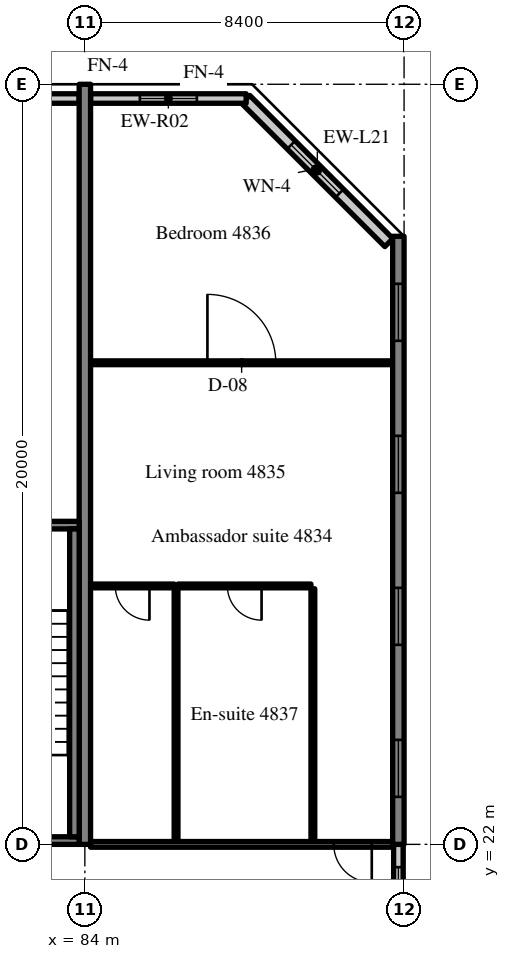
"""IFC4 building model, lengths in metres.
Left out: names, types, materials, properties, quantities, classifications, styles, units other than length and angle.
Written with IfcOpenShell. Run it as: python <this file> out.ifc"""

import sys

from ifc_helpers import new_model, si_unit, direction, frame, frame_2d, origin, place, context, subcontext, project, spatial, rectangle, extrude, source, transform, mapped, element, fill, save


model = new_model("IFC4")
c1 = context("Model", 3, precision=1e-05, world=origin(), true_north=direction((0.0, 1.0)))
c2 = subcontext(c1, "Body", "Model", "MODEL_VIEW")
j1 = project(units=[si_unit("LENGTHUNIT", "METRE"), si_unit("PLANEANGLEUNIT", "RADIAN")], contexts=[c1])
p1 = place(None, origin())
s1 = spatial("IfcSite", under=j1, at=p1, CompositionType="ELEMENT")
p2 = place(p1, origin())
s2 = spatial("IfcBuilding", under=s1, at=p2, CompositionType="ELEMENT")
p3 = place(p2, frame((0.0, 0.0, 197.2)))
s3 = spatial("IfcBuildingStorey", under=s2, at=p3, CompositionType="ELEMENT", Elevation=197.2)
m1 = source(origin(), c2, "Body", "SweptSolid", [
    extrude(rectangle(XDim=20.0, YDim=0.3, at=frame_2d((10.0, 0.0))), origin(), (0.0, 0.0, 1.0), 3.52),
])
p4 = place(p3, frame((84.0, 22.0, 0.0), z_axis=(0.0, 0.0, 1.0), x_axis=(0.0, 1.0, 0.0)))
e1 = element("IfcWall", 1, at=p4, inside=s3, PredefinedType="SHEAR", context=c2, shape_type="MappedRepresentation", body=[
    mapped(m1, transform((0.0, 0.0, 0.0), scale=1.0)),
])
m2 = source(origin(), c2, "Body", "SweptSolid", [
    extrude(rectangle(XDim=16.0, YDim=0.3, at=frame_2d((8.0, 0.0))), origin(), (0.0, 0.0, 1.0), 3.52),
])
p5 = place(p3, frame((92.25, 22.0, 0.0), z_axis=(0.0, 0.0, 1.0), x_axis=(0.0, 1.0, 0.0)))
e2 = element("IfcWall", 2, at=p5, inside=s3, PredefinedType="SHEAR", context=c2, shape_type="MappedRepresentation", body=[
    mapped(m2, transform((0.0, 0.0, 0.0), scale=1.0)),
])
m3 = source(origin(), c2, "Body", "SweptSolid", [
    extrude(rectangle(XDim=1.5, YDim=1.5, at=frame_2d((0.75, 0.75))), frame((0.0, 0.16, 0.0), z_axis=(0.0, -1.0, 0.0), x_axis=(1.0, 0.0, 0.0)), (0.0, 0.0, 1.0), 0.32),
])
p6 = place(p5, frame((1.25, 0.0, 0.9)))
e3 = element("IfcOpeningElement", 3, at=p6, cuts=e2, PredefinedType="OPENING", context=c2, shape_type="MappedRepresentation", body=[
    mapped(m3, transform((0.0, 0.0, 0.0), scale=1.0)),
])
p7 = place(p5, frame((5.25, 0.0, 0.9)))
e4 = element("IfcOpeningElement", 4, at=p7, cuts=e2, PredefinedType="OPENING", context=c2, shape_type="MappedRepresentation", body=[
    mapped(m3, transform((0.0, 0.0, 0.0), scale=1.0)),
])
p8 = place(p5, frame((9.25, 0.0, 0.9)))
e5 = element("IfcOpeningElement", 5, at=p8, cuts=e2, PredefinedType="OPENING", context=c2, shape_type="MappedRepresentation", body=[
    mapped(m3, transform((0.0, 0.0, 0.0), scale=1.0)),
])
p9 = place(p5, frame((13.25, 0.0, 0.9)))
e6 = element("IfcOpeningElement", 6, at=p9, cuts=e2, PredefinedType="OPENING", context=c2, shape_type="MappedRepresentation", body=[
    mapped(m3, transform((0.0, 0.0, 0.0), scale=1.0)),
])
m4 = source(origin(), c2, "Body", "SweptSolid", [
    extrude(rectangle(XDim=5.326, YDim=0.3, at=frame_2d((2.663, 0.0))), origin(), (0.0, 0.0, 1.0), 3.52),
])
p10 = place(p3, frame((92.0, 37.834, 0.0), z_axis=(0.0, 0.0, 1.0), x_axis=(-0.707083859269, 0.707129702361, 0.0)))
e7 = element("IfcWall", 7, at=p10, inside=s3, PredefinedType="SOLIDWALL", context=c2, shape_type="MappedRepresentation", body=[
    mapped(m4, transform((0.0, 0.0, 0.0), scale=1.0)),
])
m5 = source(origin(), c2, "Body", "SweptSolid", [
    extrude(rectangle(XDim=1.8, YDim=1.5, at=frame_2d((0.9, 0.75))), frame((0.0, 0.16, 0.0), z_axis=(0.0, -1.0, 0.0), x_axis=(1.0, 0.0, 0.0)), (0.0, 0.0, 1.0), 0.32),
])
p11 = place(p10, frame((1.836, 0.0, 0.9)))
e8 = element("IfcOpeningElement", 8, at=p11, cuts=e7, PredefinedType="OPENING", context=c2, shape_type="MappedRepresentation", body=[
    mapped(m5, transform((0.0, 0.0, 0.0), scale=1.0)),
])
m6 = source(origin(), c2, "Body", "SweptSolid", [
    extrude(rectangle(XDim=1.708, YDim=0.25, at=frame_2d((0.854, 0.0))), origin(), (0.0, 0.0, 1.0), 2.87),
])
p12 = place(p3, frame((83.85, 41.625, 0.0), z_axis=(0.0, 0.0, 1.0), x_axis=(-1.0, 0.0, 0.0)))
e9 = element("IfcWall", 9, at=p12, inside=s3, PredefinedType="SOLIDWALL", context=c2, shape_type="MappedRepresentation", body=[
    mapped(m6, transform((0.0, 0.0, 0.0), scale=1.0)),
])
m7 = source(origin(), c2, "Body", "SweptSolid", [
    extrude(rectangle(XDim=4.095, YDim=0.25, at=frame_2d((2.047, 0.0))), origin(), (0.0, 0.0, 1.0), 2.87),
])
p13 = place(p3, frame((88.245, 41.625, 0.0), z_axis=(0.0, 0.0, 1.0), x_axis=(-1.0, 0.0, 0.0)))
e10 = element("IfcWall", 10, at=p13, inside=s3, PredefinedType="SOLIDWALL", context=c2, shape_type="MappedRepresentation", body=[
    mapped(m7, transform((0.0, 0.0, 0.0), scale=1.0)),
])
m8 = source(origin(), c2, "Body", "SweptSolid", [
    extrude(rectangle(XDim=1.5, YDim=1.5, at=frame_2d((0.75, 0.75))), frame((0.0, 0.135, 0.0), z_axis=(0.0, -1.0, 0.0), x_axis=(1.0, 0.0, 0.0)), (0.0, 0.0, 1.0), 0.27),
])
p14 = place(p13, frame((1.297, 0.0, 0.9)))
e11 = element("IfcOpeningElement", 11, at=p14, cuts=e10, PredefinedType="OPENING", context=c2, shape_type="MappedRepresentation", body=[
    mapped(m8, transform((0.0, 0.0, 0.0), scale=1.0)),
])
m9 = source(origin(), c2, "Body", "SweptSolid", [
    extrude(rectangle(XDim=2.4, YDim=0.25, at=frame_2d((1.2, 0.0))), origin(), (0.0, 0.0, 1.0), 2.62),
])
p15 = place(p3, frame((92.25, 19.6, 0.0), z_axis=(0.0, 0.0, 1.0), x_axis=(0.0, 1.0, 0.0)))
e12 = element("IfcWall", 12, at=p15, inside=s3, PredefinedType="SOLIDWALL", context=c2, shape_type="MappedRepresentation", body=[
    mapped(m9, transform((0.0, 0.0, 0.0), scale=1.0)),
])
m10 = source(origin(), c2, "Body", "SweptSolid", [
    extrude(rectangle(XDim=1.2, YDim=1.5, at=frame_2d((0.6, 0.75))), frame((0.0, 0.135, 0.0), z_axis=(0.0, -1.0, 0.0), x_axis=(1.0, 0.0, 0.0)), (0.0, 0.0, 1.0), 0.27),
])
p16 = place(p15, frame((0.6, 0.0, 0.9)))
e13 = element("IfcOpeningElement", 13, at=p16, cuts=e12, PredefinedType="OPENING", context=c2, shape_type="MappedRepresentation", body=[
    mapped(m10, transform((0.0, 0.0, 0.0), scale=1.0)),
])
m11 = source(origin(), c2, "Body", "SweptSolid", [
    extrude(rectangle(XDim=8.25, YDim=0.2, at=frame_2d((4.125, 0.0))), origin(), (0.0, 0.0, 1.0), 3.52),
])
p17 = place(p3, frame((83.85, 22.1, 0.0), z_axis=(0.0, 0.0, 1.0), x_axis=(-1.0, 0.0, 0.0)))
e14 = element("IfcWall", 14, at=p17, inside=s3, PredefinedType="SOLIDWALL", context=c2, shape_type="MappedRepresentation", body=[
    mapped(m11, transform((0.0, 0.0, 0.0), scale=1.0)),
])
m12 = source(origin(), c2, "Body", "SweptSolid", [
    extrude(rectangle(XDim=1.2, YDim=2.1, at=frame_2d((0.6, 1.05))), frame((0.0, 0.11, 0.0), z_axis=(0.0, -1.0, 0.0), x_axis=(1.0, 0.0, 0.0)), (0.0, 0.0, 1.0), 0.22),
])
p18 = place(p17, frame((6.05, 0.0, 0.0)))
e15 = element("IfcOpeningElement", 15, at=p18, cuts=e14, PredefinedType="OPENING", context=c2, shape_type="MappedRepresentation", body=[
    mapped(m12, transform((0.0, 0.0, 0.0), scale=1.0)),
])
p19 = place(p3, frame((83.85, 30.4, 0.0), z_axis=(0.0, 0.0, 1.0), x_axis=(-1.0, 0.0, 0.0)))
e16 = element("IfcWall", 16, at=p19, inside=s3, PredefinedType="SOLIDWALL", context=c2, shape_type="MappedRepresentation", body=[
    mapped(m11, transform((0.0, 0.0, 0.0), scale=1.0)),
])
m13 = source(origin(), c2, "Body", "SweptSolid", [
    extrude(rectangle(XDim=1.0, YDim=2.1, at=frame_2d((0.5, 1.05))), frame((0.0, 0.11, 0.0), z_axis=(0.0, -1.0, 0.0), x_axis=(1.0, 0.0, 0.0)), (0.0, 0.0, 1.0), 0.22),
])
p20 = place(p19, frame((6.15, 0.0, 0.0)))
e17 = element("IfcOpeningElement", 17, at=p20, cuts=e16, PredefinedType="OPENING", context=c2, shape_type="MappedRepresentation", body=[
    mapped(m13, transform((0.0, 0.0, 0.0), scale=1.0)),
])
m14 = source(origin(), c2, "Body", "SweptSolid", [
    extrude(rectangle(XDim=8.1, YDim=0.25, at=frame_2d((4.05, 0.0))), origin(), (0.0, 0.0, 1.0), 3.52),
])
p21 = place(p3, frame((83.725, 22.2, 0.0), z_axis=(0.0, 0.0, 1.0), x_axis=(0.0, 1.0, 0.0)))
e18 = element("IfcWall", 18, at=p21, inside=s3, PredefinedType="SOLIDWALL", context=c2, shape_type="MappedRepresentation", body=[
    mapped(m14, transform((0.0, 0.0, 0.0), scale=1.0)),
])
m15 = source(origin(), c2, "Body", "SweptSolid", [
    extrude(rectangle(XDim=6.65, YDim=0.1, at=frame_2d((3.325, 0.0))), origin(), (0.0, 0.0, 1.0), 3.52),
])
for number, where, z_axis, x_axis in (
    (19, (90.0, 22.075, 0.0), (0.0, 0.0, 1.0), (0.0, 1.0, 0.0)),
    (20, (86.4, 22.075, 0.0), (0.0, 0.0, 1.0), (0.0, 1.0, 0.0)),
):
    element("IfcWall", number, at=place(p3, frame(where, z_axis=z_axis, x_axis=x_axis)), inside=s3, PredefinedType="PARTITIONING", context=c2, shape_type="MappedRepresentation", body=[
        mapped(m15, transform((0.0, 0.0, 0.0), scale=1.0)),
    ])
m16 = source(origin(), c2, "Body", "SweptSolid", [
    extrude(rectangle(XDim=3.5, YDim=0.1, at=frame_2d((1.75, 0.0))), origin(), (0.0, 0.0, 1.0), 3.52),
])
p22 = place(p3, frame((86.45, 28.8, 0.0), z_axis=(0.0, 0.0, 1.0), x_axis=(1.0, 0.0, 0.0)))
e21 = element("IfcWall", 21, at=p22, inside=s3, PredefinedType="PARTITIONING", context=c2, shape_type="MappedRepresentation", body=[
    mapped(m16, transform((0.0, 0.0, 0.0), scale=1.0)),
])
m17 = source(origin(), c2, "Body", "SweptSolid", [
    extrude(rectangle(XDim=0.9, YDim=2.1, at=frame_2d((0.45, 1.05))), frame((0.0, 0.06, 0.0), z_axis=(0.0, -1.0, 0.0), x_axis=(1.0, 0.0, 0.0)), (0.0, 0.0, 1.0), 0.12),
])
p23 = place(p22, frame((1.3, 0.0, 0.0)))
e22 = element("IfcOpeningElement", 22, at=p23, cuts=e21, PredefinedType="OPENING", context=c2, shape_type="MappedRepresentation", body=[
    mapped(m17, transform((0.0, 0.0, 0.0), scale=1.0)),
])
m18 = source(origin(), c2, "Body", "SweptSolid", [
    extrude(rectangle(XDim=2.2, YDim=0.1, at=frame_2d((1.1, 0.0))), origin(), (0.0, 0.0, 1.0), 3.52),
])
p24 = place(p3, frame((84.15, 28.8, 0.0), z_axis=(0.0, 0.0, 1.0), x_axis=(1.0, 0.0, 0.0)))
e23 = element("IfcWall", 23, at=p24, inside=s3, PredefinedType="PARTITIONING", context=c2, shape_type="MappedRepresentation", body=[
    mapped(m18, transform((0.0, 0.0, 0.0), scale=1.0)),
])
p25 = place(p24, frame((0.65, 0.0, 0.0)))
e24 = element("IfcOpeningElement", 24, at=p25, cuts=e23, PredefinedType="OPENING", context=c2, shape_type="MappedRepresentation", body=[
    mapped(m17, transform((0.0, 0.0, 0.0), scale=1.0)),
])
m19 = source(origin(), c2, "Body", "SweptSolid", [
    extrude(rectangle(XDim=7.95, YDim=0.1, at=frame_2d((3.975, 0.0))), origin(), (0.0, 0.0, 1.0), 3.52),
])
p26 = place(p3, frame((84.15, 34.672, 0.0), z_axis=(0.0, 0.0, 1.0), x_axis=(1.0, 0.0, 0.0)))
e25 = element("IfcWall", 25, at=p26, inside=s3, PredefinedType="PARTITIONING", context=c2, shape_type="MappedRepresentation", body=[
    mapped(m19, transform((0.0, 0.0, 0.0), scale=1.0)),
])
m20 = source(origin(), c2, "Body", "SweptSolid", [
    extrude(rectangle(XDim=1.8, YDim=2.1, at=frame_2d((0.9, 1.05))), frame((0.0, 0.06, 0.0), z_axis=(0.0, -1.0, 0.0), x_axis=(1.0, 0.0, 0.0)), (0.0, 0.0, 1.0), 0.12),
])
p27 = place(p26, frame((3.075, 0.0, 0.0)))
e26 = element("IfcOpeningElement", 26, at=p27, cuts=e25, PredefinedType="OPENING", context=c2, shape_type="MappedRepresentation", body=[
    mapped(m20, transform((0.0, 0.0, 0.0), scale=1.0)),
])
m21 = source(origin(), c2, "Body", "SweptSolid", [
    extrude(rectangle(XDim=7.95, YDim=0.15, at=frame_2d((3.975, 0.0))), origin(), (0.0, 0.0, 1.0), 2.82),
])
p28 = place(p3, frame((84.15, 22.0, 0.0), z_axis=(0.0, 0.0, 1.0), x_axis=(1.0, 0.0, 0.0)))
e27 = element("IfcWall", 27, at=p28, inside=s3, PredefinedType="PARTITIONING", context=c2, shape_type="MappedRepresentation", body=[
    mapped(m21, transform((0.0, 0.0, 0.0), scale=1.0)),
])
m22 = source(origin(), c2, "Body", "SweptSolid", [
    extrude(rectangle(XDim=1.0, YDim=2.1, at=frame_2d((0.5, 1.05))), frame((0.0, 0.085, 0.0), z_axis=(0.0, -1.0, 0.0), x_axis=(1.0, 0.0, 0.0)), (0.0, 0.0, 1.0), 0.17),
])
p29 = place(p28, frame((6.4, 0.0, 0.0)))
e28 = element("IfcOpeningElement", 28, at=p29, cuts=e27, PredefinedType="OPENING", context=c2, shape_type="MappedRepresentation", body=[
    mapped(m22, transform((0.0, 0.0, 0.0), scale=1.0)),
])
m23 = source(origin(), c2, "Body", "SweptSolid", [
    extrude(rectangle(XDim=1.8, YDim=1.5, at=frame_2d((0.9, 0.75))), frame((0.0, 0.03, 0.0), z_axis=(0.0, -1.0, 0.0), x_axis=(1.0, 0.0, 0.0)), (0.0, 0.0, 1.0), 0.06),
])
p30 = place(p11, origin())
e29 = element("IfcWindow", 29, at=p30, inside=s3, PartitioningType="SINGLE_PANEL", PredefinedType="WINDOW", context=c2, shape_type="MappedRepresentation", body=[
    mapped(m23, transform((0.0, 0.0, 0.0), scale=1.0)),
])
fill(e8, e29)
m24 = source(origin(), c2, "Body", "SweptSolid", [
    extrude(rectangle(XDim=1.5, YDim=1.5, at=frame_2d((0.75, 0.75))), frame((0.0, 0.03, 0.0), z_axis=(0.0, -1.0, 0.0), x_axis=(1.0, 0.0, 0.0)), (0.0, 0.0, 1.0), 0.06),
])
p31 = place(p14, origin())
e30 = element("IfcWindow", 30, at=p31, inside=s3, PartitioningType="SINGLE_PANEL", PredefinedType="WINDOW", context=c2, shape_type="MappedRepresentation", body=[
    mapped(m24, transform((0.0, 0.0, 0.0), scale=1.0)),
])
fill(e11, e30)
p32 = place(p6, origin())
e31 = element("IfcWindow", 31, at=p32, inside=s3, PartitioningType="SINGLE_PANEL", PredefinedType="WINDOW", context=c2, shape_type="MappedRepresentation", body=[
    mapped(m24, transform((0.0, 0.0, 0.0), scale=1.0)),
])
fill(e3, e31)
p33 = place(p7, origin())
e32 = element("IfcWindow", 32, at=p33, inside=s3, PartitioningType="SINGLE_PANEL", PredefinedType="WINDOW", context=c2, shape_type="MappedRepresentation", body=[
    mapped(m24, transform((0.0, 0.0, 0.0), scale=1.0)),
])
fill(e4, e32)
p34 = place(p8, origin())
e33 = element("IfcWindow", 33, at=p34, inside=s3, PartitioningType="SINGLE_PANEL", PredefinedType="WINDOW", context=c2, shape_type="MappedRepresentation", body=[
    mapped(m24, transform((0.0, 0.0, 0.0), scale=1.0)),
])
fill(e5, e33)
p35 = place(p9, origin())
e34 = element("IfcWindow", 34, at=p35, inside=s3, PartitioningType="SINGLE_PANEL", PredefinedType="WINDOW", context=c2, shape_type="MappedRepresentation", body=[
    mapped(m24, transform((0.0, 0.0, 0.0), scale=1.0)),
])
fill(e6, e34)
m25 = source(origin(), c2, "Body", "SweptSolid", [
    extrude(rectangle(XDim=1.2, YDim=1.5, at=frame_2d((0.6, 0.75))), frame((0.0, 0.03, 0.0), z_axis=(0.0, -1.0, 0.0), x_axis=(1.0, 0.0, 0.0)), (0.0, 0.0, 1.0), 0.06),
])
p36 = place(p16, origin())
e35 = element("IfcWindow", 35, at=p36, inside=s3, PartitioningType="SINGLE_PANEL", PredefinedType="WINDOW", context=c2, shape_type="MappedRepresentation", body=[
    mapped(m25, transform((0.0, 0.0, 0.0), scale=1.0)),
])
fill(e13, e35)
m26 = source(origin(), c2, "Body", "SweptSolid", [
    extrude(rectangle(XDim=0.9, YDim=2.1, at=frame_2d((0.45, 1.05))), frame((0.0, 0.025, 0.0), z_axis=(0.0, -1.0, 0.0), x_axis=(1.0, 0.0, 0.0)), (0.0, 0.0, 1.0), 0.05),
])
p37 = place(p23, origin())
e36 = element("IfcDoor", 36, at=p37, inside=s3, OperationType="SINGLE_SWING_RIGHT", PredefinedType="DOOR", context=c2, shape_type="MappedRepresentation", body=[
    mapped(m26, transform((0.0, 0.0, 0.0), scale=1.0)),
])
fill(e22, e36)
p38 = place(p25, origin())
e37 = element("IfcDoor", 37, at=p38, inside=s3, OperationType="SINGLE_SWING_RIGHT", PredefinedType="DOOR", context=c2, shape_type="MappedRepresentation", body=[
    mapped(m26, transform((0.0, 0.0, 0.0), scale=1.0)),
])
fill(e24, e37)
m27 = source(origin(), c2, "Body", "SweptSolid", [
    extrude(rectangle(XDim=1.8, YDim=2.1, at=frame_2d((0.9, 1.05))), frame((0.0, 0.025, 0.0), z_axis=(0.0, -1.0, 0.0), x_axis=(1.0, 0.0, 0.0)), (0.0, 0.0, 1.0), 0.05),
])
p39 = place(p27, origin())
e38 = element("IfcDoor", 38, at=p39, inside=s3, OperationType="DOUBLE_DOOR_SINGLE_SWING", PredefinedType="DOOR", context=c2, shape_type="MappedRepresentation", body=[
    mapped(m27, transform((0.0, 0.0, 0.0), scale=1.0)),
])
fill(e26, e38)
m28 = source(origin(), c2, "Body", "SweptSolid", [
    extrude(rectangle(XDim=1.0, YDim=2.1, at=frame_2d((0.5, 1.05))), frame((0.0, 0.025, 0.0), z_axis=(0.0, -1.0, 0.0), x_axis=(1.0, 0.0, 0.0)), (0.0, 0.0, 1.0), 0.05),
])
p40 = place(p29, origin())
e39 = element("IfcDoor", 39, at=p40, inside=s3, OperationType="SINGLE_SWING_RIGHT", PredefinedType="DOOR", context=c2, shape_type="MappedRepresentation", body=[
    mapped(m28, transform((0.0, 0.0, 0.0), scale=1.0)),
])
fill(e28, e39)
save(model, sys.argv[1])
